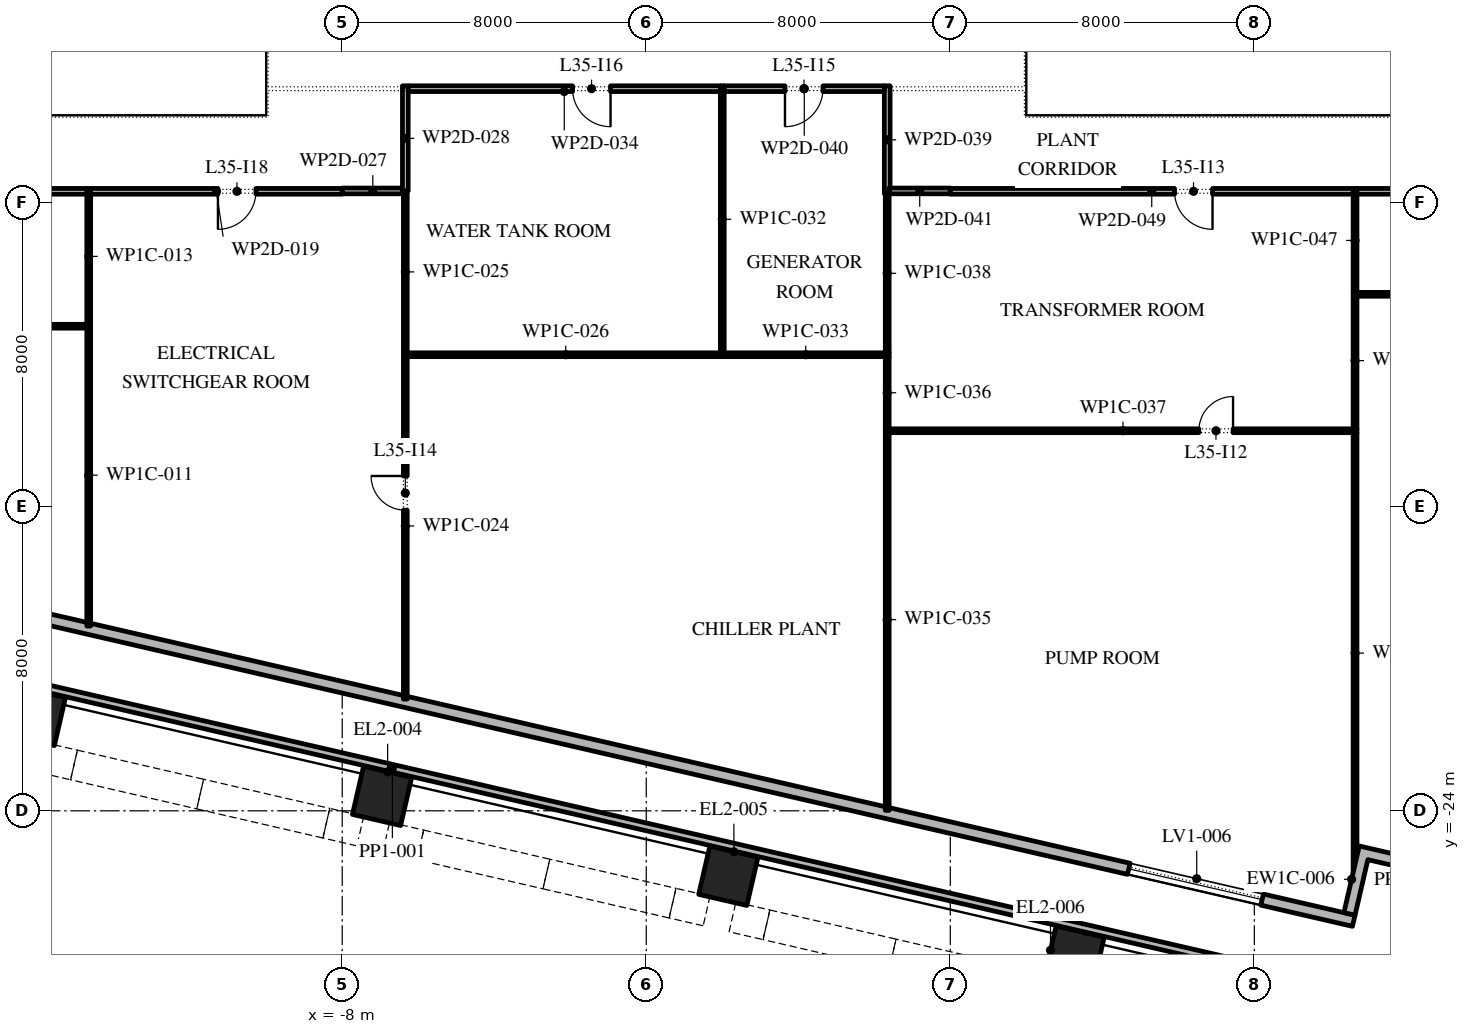
"""IFC4 building model, lengths in metres.
Left out: names, types, materials, properties, quantities, classifications, styles, units other than length and angle.
Written with IfcOpenShell. Run it as: python <this file> out.ifc"""

import sys

from ifc_helpers import new_model, si_unit, direction, frame, frame_2d, origin, origin_2d, place, context, subcontext, project, spatial, polyline, rectangle, outline, extrude, element, fill, save


model = new_model("IFC4")
c1 = context("Model", 3, precision=1e-05, world=origin(), true_north=direction((0.0, 1.0)))
c2 = subcontext(c1, "Body", "Model", "MODEL_VIEW")
j1 = project(units=[si_unit("LENGTHUNIT", "METRE"), si_unit("PLANEANGLEUNIT", "RADIAN")], contexts=[c1])
p1 = place(None, origin())
s1 = spatial("IfcSite", under=j1, at=p1, CompositionType="ELEMENT")
p2 = place(p1, origin())
s2 = spatial("IfcBuilding", under=s1, at=p2, CompositionType="ELEMENT")
p3 = place(p2, frame((0.0, 0.0, 160.2)))
s3 = spatial("IfcBuildingStorey", under=s2, at=p3, CompositionType="ELEMENT", Elevation=160.2)
for number, where, z_axis, x_axis in (
    (1, (-16.061, -21.505, 0.0), (0.0, 0.0, 1.0), (0.974, -0.225, 0.0)),
    (2, (-6.951, -23.608, 0.0), (0.0, 0.0, 1.0), (0.974, -0.225, 0.0)),
    (3, (2.159, -25.711, 0.0), (0.0, 0.0, 1.0), (0.974, -0.225, 0.0)),
    (4, (11.27, -27.815, 0.0), (0.0, 0.0, 1.0), (0.974, -0.225, 0.0)),
):
    element("IfcColumn", number, at=place(p3, frame(where, z_axis=z_axis, x_axis=x_axis)), inside=s3, PredefinedType="COLUMN", context=c2, shape_type="SweptSolid", body=[
        extrude(rectangle(XDim=1.3, YDim=1.3, at=origin_2d()), origin(), (0.0, 0.0, 1.0), 5.4),
    ])
p4 = place(p3, frame((-31.078, -15.421, 0.0), z_axis=(0.0, 0.0, 1.0), x_axis=(0.974370456532, -0.224949357493, 0.0)))
e5 = element("IfcWall", 5, at=p4, inside=s3, PredefinedType="STANDARD", context=c2, shape_type="SweptSolid", body=[
    extrude(rectangle(XDim=51.0, YDim=0.3, at=frame_2d((25.5, 0.0))), origin(), (0.0, 0.0, 1.0), 4.95),
])
p5 = place(p4, frame((10.725, 0.0, 0.6)))
e6 = element("IfcOpeningElement", 6, at=p5, cuts=e5, PredefinedType="OPENING", context=c2, shape_type="SweptSolid", body=[
    extrude(rectangle(XDim=3.6, YDim=3.25, at=frame_2d((1.8, 1.625))), frame((0.0, 0.16, 0.0), z_axis=(0.0, -1.0, 0.0), x_axis=(1.0, 0.0, 0.0)), (0.0, 0.0, 1.0), 0.32),
])
p6 = place(p4, frame((44.925, 0.0, 0.6)))
e7 = element("IfcOpeningElement", 7, at=p6, cuts=e5, PredefinedType="OPENING", context=c2, shape_type="SweptSolid", body=[
    extrude(rectangle(XDim=3.6, YDim=3.9, at=frame_2d((1.8, 1.95))), frame((0.0, 0.16, 0.0), z_axis=(0.0, -1.0, 0.0), x_axis=(1.0, 0.0, 0.0)), (0.0, 0.0, 1.0), 0.32),
])
p7 = place(p3, origin())
e8 = element("IfcWall", 8, at=p7, inside=s3, PredefinedType="STANDARD", context=c2, shape_type="SweptSolid", body=[
    extrude(outline(polyline([(20.515, -25.331), (20.92, -23.577), (22.967, -24.049), (22.899, -24.342), (21.145, -23.937), (20.74, -25.691), (18.986, -25.286), (18.649, -26.747), (18.357, -26.68), (18.762, -24.926), (20.515, -25.331)])), origin(), (0.0, 0.0, 1.0), 4.95),
])
p8 = place(p3, frame((-33.261, -16.744, -0.05), z_axis=(0.0, 0.0, 1.0), x_axis=(0.974370602864, -0.224948723658, 0.0)))
e9 = element("IfcWall", 9, at=p8, inside=s3, PredefinedType="STANDARD", context=c2, shape_type="SweptSolid", body=[
    extrude(rectangle(XDim=54.56, YDim=0.2, at=frame_2d((27.28, 0.0))), origin(), (0.0, 0.0, 1.0), 1.1),
])
p9 = place(p3, frame((-14.67, -19.138, 0.0), z_axis=(0.0, 0.0, 1.0), x_axis=(0.0, 1.0, 0.0)))
e10 = element("IfcWall", 10, at=p9, inside=s3, PredefinedType="PARTITIONING", context=c2, shape_type="SweptSolid", body=[
    extrude(rectangle(XDim=7.938, YDim=0.1, at=frame_2d((3.969, 0.0))), origin(), (0.0, 0.0, 1.0), 4.95),
])
p10 = place(p3, frame((-14.72, -11.25, 0.0), z_axis=(0.0, 0.0, 1.0), x_axis=(-1.0, 0.0, 0.0)))
e11 = element("IfcWall", 11, at=p10, inside=s3, PredefinedType="PARTITIONING", context=c2, shape_type="SweptSolid", body=[
    extrude(rectangle(XDim=8.24, YDim=0.1, at=frame_2d((4.12, 0.0))), origin(), (0.0, 0.0, 1.0), 4.95),
])
p11 = place(p10, frame((2.94, 0.0, 0.0)))
e12 = element("IfcOpeningElement", 12, at=p11, cuts=e11, PredefinedType="OPENING", context=c2, shape_type="SweptSolid", body=[
    extrude(rectangle(XDim=0.9, YDim=2.1, at=frame_2d((0.45, 1.05))), frame((0.0, 0.06, 0.0), z_axis=(0.0, -1.0, 0.0), x_axis=(1.0, 0.0, 0.0)), (0.0, 0.0, 1.0), 0.12),
])
p12 = place(p3, frame((-14.67, -11.2, 0.0), z_axis=(0.0, 0.0, 1.0), x_axis=(0.0, 1.0, 0.0)))
e13 = element("IfcWall", 13, at=p12, inside=s3, PredefinedType="PARTITIONING", context=c2, shape_type="SweptSolid", body=[
    extrude(rectangle(XDim=3.575, YDim=0.1, at=frame_2d((1.788, 0.0))), origin(), (0.0, 0.0, 1.0), 4.95),
])
p13 = place(p3, frame((-14.72, -7.7, 0.0), z_axis=(0.0, 0.0, 1.0), x_axis=(-1.0, 0.0, 0.0)))
e14 = element("IfcWall", 14, at=p13, inside=s3, PredefinedType="PARTITIONING", context=c2, shape_type="SweptSolid", body=[
    extrude(rectangle(XDim=9.205, YDim=0.15, at=frame_2d((4.603, 0.0))), origin(), (0.0, 0.0, 1.0), 4.95),
])
p14 = place(p13, frame((5.13, 0.0, 0.0)))
e15 = element("IfcOpeningElement", 15, at=p14, cuts=e14, PredefinedType="OPENING", context=c2, shape_type="SweptSolid", body=[
    extrude(rectangle(XDim=1.0, YDim=2.1, at=frame_2d((0.5, 1.05))), frame((0.0, 0.085, 0.0), z_axis=(0.0, -1.0, 0.0), x_axis=(1.0, 0.0, 0.0)), (0.0, 0.0, 1.0), 0.17),
])
p15 = place(p3, frame((-8.0, -7.7, 0.0), z_axis=(0.0, 0.0, 1.0), x_axis=(-1.0, 0.0, 0.0)))
e16 = element("IfcWall", 16, at=p15, inside=s3, PredefinedType="PARTITIONING", context=c2, shape_type="SweptSolid", body=[
    extrude(rectangle(XDim=6.62, YDim=0.15, at=frame_2d((3.31, 0.0))), origin(), (0.0, 0.0, 1.0), 4.95),
])
p16 = place(p15, frame((2.27, 0.0, 0.0)))
e17 = element("IfcOpeningElement", 17, at=p16, cuts=e16, PredefinedType="OPENING", context=c2, shape_type="SweptSolid", body=[
    extrude(rectangle(XDim=1.0, YDim=2.1, at=frame_2d((0.5, 1.05))), frame((0.0, 0.085, 0.0), z_axis=(0.0, -1.0, 0.0), x_axis=(1.0, 0.0, 0.0)), (0.0, 0.0, 1.0), 0.17),
])
p17 = place(p3, frame((-6.34, -21.061, 0.0), z_axis=(0.0, 0.0, 1.0), x_axis=(0.0, 1.0, 0.0)))
e18 = element("IfcWall", 18, at=p17, inside=s3, PredefinedType="PARTITIONING", context=c2, shape_type="SweptSolid", body=[
    extrude(rectangle(XDim=9.111, YDim=0.1, at=frame_2d((4.556, 0.0))), origin(), (0.0, 0.0, 1.0), 4.95),
])
p18 = place(p17, frame((4.971, 0.0, 0.0)))
e19 = element("IfcOpeningElement", 19, at=p18, cuts=e18, PredefinedType="OPENING", context=c2, shape_type="SweptSolid", body=[
    extrude(rectangle(XDim=0.9, YDim=2.1, at=frame_2d((0.45, 1.05))), frame((0.0, 0.06, 0.0), z_axis=(0.0, -1.0, 0.0), x_axis=(1.0, 0.0, 0.0)), (0.0, 0.0, 1.0), 0.12),
])
p19 = place(p3, frame((-6.34, -11.95, 0.0), z_axis=(0.0, 0.0, 1.0), x_axis=(0.0, 1.0, 0.0)))
e20 = element("IfcWall", 20, at=p19, inside=s3, PredefinedType="PARTITIONING", context=c2, shape_type="SweptSolid", body=[
    extrude(rectangle(XDim=4.26, YDim=0.1, at=frame_2d((2.13, 0.0))), origin(), (0.0, 0.0, 1.0), 4.95),
])
p20 = place(p3, frame((-6.29, -12.0, 0.0), z_axis=(0.0, 0.0, 1.0), x_axis=(1.0, 0.0, 0.0)))
e21 = element("IfcWall", 21, at=p20, inside=s3, PredefinedType="PARTITIONING", context=c2, shape_type="SweptSolid", body=[
    extrude(rectangle(XDim=8.34, YDim=0.1, at=frame_2d((4.17, 0.0))), origin(), (0.0, 0.0, 1.0), 4.95),
])
p21 = place(p3, frame((-6.39, -7.69, 0.0), z_axis=(0.0, 0.0, 1.0), x_axis=(-1.0, 0.0, 0.0)))
e22 = element("IfcWall", 22, at=p21, inside=s3, PredefinedType="PARTITIONING", context=c2, shape_type="SweptSolid", body=[
    extrude(rectangle(XDim=1.61, YDim=0.15, at=frame_2d((0.805, 0.0))), origin(), (0.0, 0.0, 1.0), 4.95),
])
p22 = place(p3, frame((-6.34, -4.925, 0.0), z_axis=(0.0, 0.0, 1.0), x_axis=(0.0, -1.0, 0.0)))
e23 = element("IfcWall", 23, at=p22, inside=s3, PredefinedType="PARTITIONING", context=c2, shape_type="SweptSolid", body=[
    extrude(rectangle(XDim=2.765, YDim=0.15, at=frame_2d((1.382, 0.0))), origin(), (0.0, 0.0, 1.0), 4.95),
])
p23 = place(p3, frame((2.0, -11.95, 0.0), z_axis=(0.0, 0.0, 1.0), x_axis=(0.0, 1.0, 0.0)))
e24 = element("IfcWall", 24, at=p23, inside=s3, PredefinedType="PARTITIONING", context=c2, shape_type="SweptSolid", body=[
    extrude(rectangle(XDim=7.025, YDim=0.1, at=frame_2d((3.512, 0.0))), origin(), (0.0, 0.0, 1.0), 4.95),
])
p24 = place(p3, frame((2.0, -12.0, 0.0), z_axis=(0.0, 0.0, 1.0), x_axis=(1.0, 0.0, 0.0)))
e25 = element("IfcWall", 25, at=p24, inside=s3, PredefinedType="PARTITIONING", context=c2, shape_type="SweptSolid", body=[
    extrude(rectangle(XDim=4.39, YDim=0.1, at=frame_2d((2.195, 0.0))), origin(), (0.0, 0.0, 1.0), 4.95),
])
p25 = place(p3, frame((1.95, -5.0, 0.0), z_axis=(0.0, 0.0, 1.0), x_axis=(-1.0, 0.0, 0.0)))
e26 = element("IfcWall", 26, at=p25, inside=s3, PredefinedType="PARTITIONING", context=c2, shape_type="SweptSolid", body=[
    extrude(rectangle(XDim=8.215, YDim=0.15, at=frame_2d((4.107, 0.0))), origin(), (0.0, 0.0, 1.0), 4.95),
])
p26 = place(p25, frame((2.89, 0.0, 0.0)))
e27 = element("IfcOpeningElement", 27, at=p26, cuts=e26, PredefinedType="OPENING", context=c2, shape_type="SweptSolid", body=[
    extrude(rectangle(XDim=1.0, YDim=2.1, at=frame_2d((0.5, 1.05))), frame((0.0, 0.085, 0.0), z_axis=(0.0, -1.0, 0.0), x_axis=(1.0, 0.0, 0.0)), (0.0, 0.0, 1.0), 0.17),
])
p27 = place(p3, frame((6.34, -23.988, 0.0), z_axis=(0.0, 0.0, 1.0), x_axis=(0.0, 1.0, 0.0)))
e28 = element("IfcWall", 28, at=p27, inside=s3, PredefinedType="PARTITIONING", context=c2, shape_type="SweptSolid", body=[
    extrude(rectangle(XDim=10.038, YDim=0.1, at=frame_2d((5.019, 0.0))), origin(), (0.0, 0.0, 1.0), 4.95),
])
p28 = place(p3, frame((6.34, -13.95, 0.0), z_axis=(0.0, 0.0, 1.0), x_axis=(0.0, 1.0, 0.0)))
e29 = element("IfcWall", 29, at=p28, inside=s3, PredefinedType="PARTITIONING", context=c2, shape_type="SweptSolid", body=[
    extrude(rectangle(XDim=1.9, YDim=0.1, at=frame_2d((0.95, 0.0))), origin(), (0.0, 0.0, 1.0), 4.95),
])
p29 = place(p3, frame((6.39, -14.0, 0.0), z_axis=(0.0, 0.0, 1.0), x_axis=(1.0, 0.0, 0.0)))
e30 = element("IfcWall", 30, at=p29, inside=s3, PredefinedType="PARTITIONING", context=c2, shape_type="SweptSolid", body=[
    extrude(rectangle(XDim=12.31, YDim=0.1, at=frame_2d((6.155, 0.0))), origin(), (0.0, 0.0, 1.0), 4.95),
])
p30 = place(p29, frame((8.15, 0.0, 0.0)))
e31 = element("IfcOpeningElement", 31, at=p30, cuts=e30, PredefinedType="OPENING", context=c2, shape_type="SweptSolid", body=[
    extrude(rectangle(XDim=0.9, YDim=2.1, at=frame_2d((0.45, 1.05))), frame((0.0, 0.06, 0.0), z_axis=(0.0, -1.0, 0.0), x_axis=(1.0, 0.0, 0.0)), (0.0, 0.0, 1.0), 0.12),
])
p31 = place(p3, frame((6.34, -11.95, 0.0), z_axis=(0.0, 0.0, 1.0), x_axis=(0.0, 1.0, 0.0)))
e32 = element("IfcWall", 32, at=p31, inside=s3, PredefinedType="PARTITIONING", context=c2, shape_type="SweptSolid", body=[
    extrude(rectangle(XDim=4.185, YDim=0.1, at=frame_2d((2.093, 0.0))), origin(), (0.0, 0.0, 1.0), 4.95),
])
p32 = place(p3, frame((6.34, -7.765, 0.0), z_axis=(0.0, 0.0, 1.0), x_axis=(0.0, 1.0, 0.0)))
e33 = element("IfcWall", 33, at=p32, inside=s3, PredefinedType="PARTITIONING", context=c2, shape_type="SweptSolid", body=[
    extrude(rectangle(XDim=2.84, YDim=0.15, at=frame_2d((1.42, 0.0))), origin(), (0.0, 0.0, 1.0), 4.95),
])
p33 = place(p3, frame((6.265, -5.0, 0.0), z_axis=(0.0, 0.0, 1.0), x_axis=(-1.0, 0.0, 0.0)))
e34 = element("IfcWall", 34, at=p33, inside=s3, PredefinedType="PARTITIONING", context=c2, shape_type="SweptSolid", body=[
    extrude(rectangle(XDim=4.215, YDim=0.15, at=frame_2d((2.107, 0.0))), origin(), (0.0, 0.0, 1.0), 4.95),
])
p34 = place(p33, frame((1.615, 0.0, 0.0)))
e35 = element("IfcOpeningElement", 35, at=p34, cuts=e34, PredefinedType="OPENING", context=c2, shape_type="SweptSolid", body=[
    extrude(rectangle(XDim=1.0, YDim=2.1, at=frame_2d((0.5, 1.05))), frame((0.0, 0.085, 0.0), z_axis=(0.0, -1.0, 0.0), x_axis=(1.0, 0.0, 0.0)), (0.0, 0.0, 1.0), 0.17),
])
p35 = place(p3, frame((8.0, -7.69, 0.0), z_axis=(0.0, 0.0, 1.0), x_axis=(-1.0, 0.0, 0.0)))
e36 = element("IfcWall", 36, at=p35, inside=s3, PredefinedType="PARTITIONING", context=c2, shape_type="SweptSolid", body=[
    extrude(rectangle(XDim=1.61, YDim=0.15, at=frame_2d((0.805, 0.0))), origin(), (0.0, 0.0, 1.0), 4.95),
])
p36 = place(p3, frame((18.65, -25.654, 0.0), z_axis=(0.0, 0.0, 1.0), x_axis=(0.0, 1.0, 0.0)))
e37 = element("IfcWall", 37, at=p36, inside=s3, PredefinedType="PARTITIONING", context=c2, shape_type="SweptSolid", body=[
    extrude(rectangle(XDim=11.604, YDim=0.1, at=frame_2d((5.802, 0.0))), origin(), (0.0, 0.0, 1.0), 4.95),
])
p37 = place(p3, frame((18.65, -13.95, 0.0), z_axis=(0.0, 0.0, 1.0), x_axis=(0.0, 1.0, 0.0)))
e38 = element("IfcWall", 38, at=p37, inside=s3, PredefinedType="PARTITIONING", context=c2, shape_type="SweptSolid", body=[
    extrude(rectangle(XDim=3.59, YDim=0.1, at=frame_2d((1.795, 0.0))), origin(), (0.0, 0.0, 1.0), 4.95),
])
p38 = place(p3, frame((18.65, -10.36, 0.0), z_axis=(0.0, 0.0, 1.0), x_axis=(0.0, 1.0, 0.0)))
e39 = element("IfcWall", 39, at=p38, inside=s3, PredefinedType="PARTITIONING", context=c2, shape_type="SweptSolid", body=[
    extrude(rectangle(XDim=2.735, YDim=0.1, at=frame_2d((1.368, 0.0))), origin(), (0.0, 0.0, 1.0), 4.95),
])
p39 = place(p3, frame((18.7, -10.41, 0.0), z_axis=(0.0, 0.0, 1.0), x_axis=(1.0, 0.0, 0.0)))
e40 = element("IfcWall", 40, at=p39, inside=s3, PredefinedType="PARTITIONING", context=c2, shape_type="SweptSolid", body=[
    extrude(rectangle(XDim=7.19, YDim=0.1, at=frame_2d((3.595, 0.0))), origin(), (0.0, 0.0, 1.0), 4.95),
])
p40 = place(p39, frame((3.15, 0.0, 0.0)))
e41 = element("IfcOpeningElement", 41, at=p40, cuts=e40, PredefinedType="OPENING", context=c2, shape_type="SweptSolid", body=[
    extrude(rectangle(XDim=0.9, YDim=2.1, at=frame_2d((0.45, 1.05))), frame((0.0, 0.06, 0.0), z_axis=(0.0, -1.0, 0.0), x_axis=(1.0, 0.0, 0.0)), (0.0, 0.0, 1.0), 0.12),
])
p41 = place(p3, frame((18.6, -7.7, 0.0), z_axis=(0.0, 0.0, 1.0), x_axis=(-1.0, 0.0, 0.0)))
e42 = element("IfcWall", 42, at=p41, inside=s3, PredefinedType="PARTITIONING", context=c2, shape_type="SweptSolid", body=[
    extrude(rectangle(XDim=10.6, YDim=0.15, at=frame_2d((5.3, 0.0))), origin(), (0.0, 0.0, 1.0), 4.95),
])
p42 = place(p41, frame((3.7, 0.0, 0.0)))
e43 = element("IfcOpeningElement", 43, at=p42, cuts=e42, PredefinedType="OPENING", context=c2, shape_type="SweptSolid", body=[
    extrude(rectangle(XDim=1.0, YDim=2.1, at=frame_2d((0.5, 1.05))), frame((0.0, 0.085, 0.0), z_axis=(0.0, -1.0, 0.0), x_axis=(1.0, 0.0, 0.0)), (0.0, 0.0, 1.0), 0.17),
])
p43 = place(p3, frame((24.075, -7.7, 0.0), z_axis=(0.0, 0.0, 1.0), x_axis=(-1.0, 0.0, 0.0)))
e44 = element("IfcWall", 44, at=p43, inside=s3, PredefinedType="PARTITIONING", context=c2, shape_type="SweptSolid", body=[
    extrude(rectangle(XDim=5.375, YDim=0.15, at=frame_2d((2.688, 0.0))), origin(), (0.0, 0.0, 1.0), 4.95),
])
p44 = place(p6, origin())
e45 = element("IfcWindow", 45, at=p44, inside=s3, PartitioningType="DOUBLE_PANEL_HORIZONTAL", PredefinedType="WINDOW", context=c2, shape_type="SweptSolid", body=[
    extrude(rectangle(XDim=3.6, YDim=3.9, at=frame_2d((1.8, 1.95))), frame((0.0, 0.03, 0.0), z_axis=(0.0, -1.0, 0.0), x_axis=(1.0, 0.0, 0.0)), (0.0, 0.0, 1.0), 0.06),
])
fill(e7, e45)
p45 = place(p30, origin())
e46 = element("IfcDoor", 46, at=p45, inside=s3, OperationType="SINGLE_SWING_LEFT", PredefinedType="DOOR", context=c2, shape_type="SweptSolid", body=[
    extrude(rectangle(XDim=0.9, YDim=2.1, at=frame_2d((0.45, 1.05))), frame((0.0, 0.025, 0.0), z_axis=(0.0, -1.0, 0.0), x_axis=(1.0, 0.0, 0.0)), (0.0, 0.0, 1.0), 0.05),
])
fill(e31, e46)
p46 = place(p42, origin())
e47 = element("IfcDoor", 47, at=p46, inside=s3, OperationType="SINGLE_SWING_RIGHT", PredefinedType="DOOR", context=c2, shape_type="SweptSolid", body=[
    extrude(rectangle(XDim=1.0, YDim=2.1, at=frame_2d((0.5, 1.05))), frame((0.0, 0.025, 0.0), z_axis=(0.0, -1.0, 0.0), x_axis=(1.0, 0.0, 0.0)), (0.0, 0.0, 1.0), 0.05),
])
fill(e43, e47)
p47 = place(p18, origin())
e48 = element("IfcDoor", 48, at=p47, inside=s3, OperationType="SINGLE_SWING_LEFT", PredefinedType="DOOR", context=c2, shape_type="SweptSolid", body=[
    extrude(rectangle(XDim=0.9, YDim=2.1, at=frame_2d((0.45, 1.05))), frame((0.0, 0.025, 0.0), z_axis=(0.0, -1.0, 0.0), x_axis=(1.0, 0.0, 0.0)), (0.0, 0.0, 1.0), 0.05),
])
fill(e19, e48)
p48 = place(p34, origin())
e49 = element("IfcDoor", 49, at=p48, inside=s3, OperationType="SINGLE_SWING_LEFT", PredefinedType="DOOR", context=c2, shape_type="SweptSolid", body=[
    extrude(rectangle(XDim=1.0, YDim=2.1, at=frame_2d((0.5, 1.05))), frame((0.0, 0.025, 0.0), z_axis=(0.0, -1.0, 0.0), x_axis=(1.0, 0.0, 0.0)), (0.0, 0.0, 1.0), 0.05),
])
fill(e35, e49)
p49 = place(p26, origin())
e50 = element("IfcDoor", 50, at=p49, inside=s3, OperationType="SINGLE_SWING_RIGHT", PredefinedType="DOOR", context=c2, shape_type="SweptSolid", body=[
    extrude(rectangle(XDim=1.0, YDim=2.1, at=frame_2d((0.5, 1.05))), frame((0.0, 0.025, 0.0), z_axis=(0.0, -1.0, 0.0), x_axis=(1.0, 0.0, 0.0)), (0.0, 0.0, 1.0), 0.05),
])
fill(e27, e50)
p50 = place(p16, origin())
e51 = element("IfcDoor", 51, at=p50, inside=s3, OperationType="SINGLE_SWING_LEFT", PredefinedType="DOOR", context=c2, shape_type="SweptSolid", body=[
    extrude(rectangle(XDim=1.0, YDim=2.1, at=frame_2d((0.5, 1.05))), frame((0.0, 0.025, 0.0), z_axis=(0.0, -1.0, 0.0), x_axis=(1.0, 0.0, 0.0)), (0.0, 0.0, 1.0), 0.05),
])
fill(e17, e51)
save(model, sys.argv[1])
